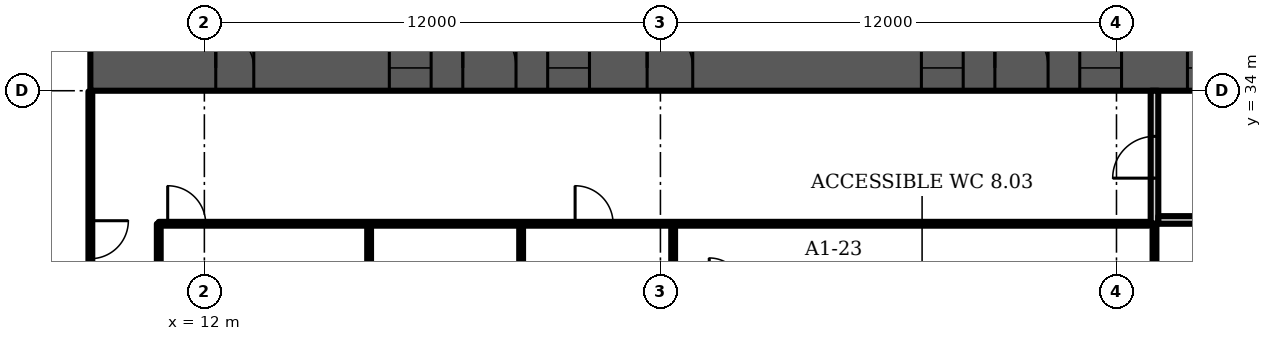
"""IFC4 building model, lengths in metres.
Left out: names, types, materials, properties, quantities, classifications, styles, units other than length and angle.
Written with IfcOpenShell. Run it as: python <this file> out.ifc"""

import sys

from ifc_helpers import new_model, si_unit, direction, frame, frame_2d, origin, place, context, subcontext, project, spatial, rectangle, extrude, element, fill, save


model = new_model("IFC4")
c1 = context("Model", 3, precision=1e-05, world=origin(), true_north=direction((0.0, 1.0)))
c2 = subcontext(c1, "Body", "Model", "MODEL_VIEW")
j1 = project(units=[si_unit("LENGTHUNIT", "METRE"), si_unit("PLANEANGLEUNIT", "RADIAN")], contexts=[c1])
p1 = place(None, origin())
s1 = spatial("IfcSite", under=j1, at=p1, CompositionType="ELEMENT")
p2 = place(p1, origin())
s2 = spatial("IfcBuilding", under=s1, at=p2, CompositionType="ELEMENT")
p3 = place(p2, frame((0.0, 0.0, 48.7)))
s3 = spatial("IfcBuildingStorey", under=s2, at=p3, CompositionType="ELEMENT", Elevation=48.7)
p4 = place(p3, frame((9.0, 34.6, 0.0), z_axis=(0.0, 0.0, 1.0), x_axis=(1.0, 0.0, 0.0)))
e1 = element("IfcWall", 1, at=p4, inside=s3, PredefinedType="SHEAR", context=c2, shape_type="SweptSolid", body=[
    extrude(rectangle(XDim=56.0, YDim=1.2, at=frame_2d((28.0, 0.0))), origin(), (0.0, 0.0, 1.0), 3.6),
])
p5 = place(p4, frame((3.3, 0.0, 0.0)))
e2 = element("IfcOpeningElement", 2, at=p5, cuts=e1, PredefinedType="OPENING", context=c2, shape_type="SweptSolid", body=[
    extrude(rectangle(XDim=1.0, YDim=2.1, at=frame_2d((0.5, 1.05))), frame((0.0, 0.61, 0.0), z_axis=(0.0, -1.0, 0.0), x_axis=(1.0, 0.0, 0.0)), (0.0, 0.0, 1.0), 1.22),
])
p6 = place(p4, frame((7.867, 0.0, 0.0)))
e3 = element("IfcOpeningElement", 3, at=p6, cuts=e1, PredefinedType="OPENING", context=c2, shape_type="SweptSolid", body=[
    extrude(rectangle(XDim=1.1, YDim=2.1, at=frame_2d((0.55, 1.05))), frame((0.0, 0.61, 0.0), z_axis=(0.0, -1.0, 0.0), x_axis=(1.0, 0.0, 0.0)), (0.0, 0.0, 1.0), 1.22),
])
p7 = place(p4, frame((12.033, 0.0, 0.0)))
e4 = element("IfcOpeningElement", 4, at=p7, cuts=e1, PredefinedType="OPENING", context=c2, shape_type="SweptSolid", body=[
    extrude(rectangle(XDim=1.1, YDim=2.1, at=frame_2d((0.55, 1.05))), frame((0.0, 0.61, 0.0), z_axis=(0.0, -1.0, 0.0), x_axis=(1.0, 0.0, 0.0)), (0.0, 0.0, 1.0), 1.22),
])
p8 = place(p4, frame((9.8, 0.0, 0.0)))
e5 = element("IfcOpeningElement", 5, at=p8, cuts=e1, PredefinedType="OPENING", context=c2, shape_type="SweptSolid", body=[
    extrude(rectangle(XDim=1.4, YDim=2.1, at=frame_2d((0.7, 1.05))), frame((0.0, 0.61, 0.0), z_axis=(0.0, -1.0, 0.0), x_axis=(1.0, 0.0, 0.0)), (0.0, 0.0, 1.0), 1.22),
])
p9 = place(p4, frame((14.65, 0.0, 0.0)))
e6 = element("IfcOpeningElement", 6, at=p9, cuts=e1, PredefinedType="OPENING", context=c2, shape_type="SweptSolid", body=[
    extrude(rectangle(XDim=1.2, YDim=2.1, at=frame_2d((0.6, 1.05))), frame((0.0, 0.61, 0.0), z_axis=(0.0, -1.0, 0.0), x_axis=(1.0, 0.0, 0.0)), (0.0, 0.0, 1.0), 1.22),
])
p10 = place(p4, frame((21.867, 0.0, 0.0)))
e7 = element("IfcOpeningElement", 7, at=p10, cuts=e1, PredefinedType="OPENING", context=c2, shape_type="SweptSolid", body=[
    extrude(rectangle(XDim=1.1, YDim=2.1, at=frame_2d((0.55, 1.05))), frame((0.0, 0.61, 0.0), z_axis=(0.0, -1.0, 0.0), x_axis=(1.0, 0.0, 0.0)), (0.0, 0.0, 1.0), 1.22),
])
p11 = place(p4, frame((26.033, 0.0, 0.0)))
e8 = element("IfcOpeningElement", 8, at=p11, cuts=e1, PredefinedType="OPENING", context=c2, shape_type="SweptSolid", body=[
    extrude(rectangle(XDim=1.1, YDim=2.1, at=frame_2d((0.55, 1.05))), frame((0.0, 0.61, 0.0), z_axis=(0.0, -1.0, 0.0), x_axis=(1.0, 0.0, 0.0)), (0.0, 0.0, 1.0), 1.22),
])
p12 = place(p4, frame((23.8, 0.0, 0.0)))
e9 = element("IfcOpeningElement", 9, at=p12, cuts=e1, PredefinedType="OPENING", context=c2, shape_type="SweptSolid", body=[
    extrude(rectangle(XDim=1.4, YDim=2.1, at=frame_2d((0.7, 1.05))), frame((0.0, 0.61, 0.0), z_axis=(0.0, -1.0, 0.0), x_axis=(1.0, 0.0, 0.0)), (0.0, 0.0, 1.0), 1.22),
])
p13 = place(p4, frame((28.867, 0.0, 0.0)))
e10 = element("IfcOpeningElement", 10, at=p13, cuts=e1, PredefinedType="OPENING", context=c2, shape_type="SweptSolid", body=[
    extrude(rectangle(XDim=1.1, YDim=2.1, at=frame_2d((0.55, 1.05))), frame((0.0, 0.61, 0.0), z_axis=(0.0, -1.0, 0.0), x_axis=(1.0, 0.0, 0.0)), (0.0, 0.0, 1.0), 1.22),
])
p14 = place(p4, frame((33.033, 0.0, 0.0)))
e11 = element("IfcOpeningElement", 11, at=p14, cuts=e1, PredefinedType="OPENING", context=c2, shape_type="SweptSolid", body=[
    extrude(rectangle(XDim=1.1, YDim=2.1, at=frame_2d((0.55, 1.05))), frame((0.0, 0.61, 0.0), z_axis=(0.0, -1.0, 0.0), x_axis=(1.0, 0.0, 0.0)), (0.0, 0.0, 1.0), 1.22),
])
p15 = place(p4, frame((40.15, 0.0, 0.0)))
e12 = element("IfcOpeningElement", 12, at=p15, cuts=e1, PredefinedType="OPENING", context=c2, shape_type="SweptSolid", body=[
    extrude(rectangle(XDim=1.2, YDim=2.1, at=frame_2d((0.6, 1.05))), frame((0.0, 0.61, 0.0), z_axis=(0.0, -1.0, 0.0), x_axis=(1.0, 0.0, 0.0)), (0.0, 0.0, 1.0), 1.22),
])
p16 = place(p4, frame((44.8, 0.0, 0.0)))
e13 = element("IfcOpeningElement", 13, at=p16, cuts=e1, PredefinedType="OPENING", context=c2, shape_type="SweptSolid", body=[
    extrude(rectangle(XDim=1.4, YDim=2.1, at=frame_2d((0.7, 1.05))), frame((0.0, 0.61, 0.0), z_axis=(0.0, -1.0, 0.0), x_axis=(1.0, 0.0, 0.0)), (0.0, 0.0, 1.0), 1.22),
])
p17 = place(p4, frame((49.867, 0.0, 0.0)))
e14 = element("IfcOpeningElement", 14, at=p17, cuts=e1, PredefinedType="OPENING", context=c2, shape_type="SweptSolid", body=[
    extrude(rectangle(XDim=1.1, YDim=2.1, at=frame_2d((0.55, 1.05))), frame((0.0, 0.61, 0.0), z_axis=(0.0, -1.0, 0.0), x_axis=(1.0, 0.0, 0.0)), (0.0, 0.0, 1.0), 1.22),
])
p18 = place(p4, frame((53.5, 0.0, 0.0)))
e15 = element("IfcOpeningElement", 15, at=p18, cuts=e1, PredefinedType="OPENING", context=c2, shape_type="SweptSolid", body=[
    extrude(rectangle(XDim=1.1, YDim=2.1, at=frame_2d((0.55, 1.05))), frame((0.0, 0.61, 0.0), z_axis=(0.0, -1.0, 0.0), x_axis=(1.0, 0.0, 0.0)), (0.0, 0.0, 1.0), 1.22),
])
p19 = place(p4, frame((51.567, 0.0, 0.0)))
e16 = element("IfcOpeningElement", 16, at=p19, cuts=e1, PredefinedType="OPENING", context=c2, shape_type="SweptSolid", body=[
    extrude(rectangle(XDim=1.4, YDim=2.1, at=frame_2d((0.7, 1.05))), frame((0.0, 0.61, 0.0), z_axis=(0.0, -1.0, 0.0), x_axis=(1.0, 0.0, 0.0)), (0.0, 0.0, 1.0), 1.22),
])
p20 = place(p3, frame((37.0, 30.5, 0.0), z_axis=(0.0, 0.0, 1.0), x_axis=(0.0, 1.0, 0.0)))
e17 = element("IfcWall", 17, at=p20, inside=s3, PredefinedType="PARTITIONING", context=c2, shape_type="SweptSolid", body=[
    extrude(rectangle(XDim=3.5, YDim=0.2, at=frame_2d((1.75, 0.0))), origin(), (0.0, 0.0, 1.0), 3.2),
])
p21 = place(p20, frame((1.2, 0.0, 0.0)))
e18 = element("IfcOpeningElement", 18, at=p21, cuts=e17, PredefinedType="OPENING", context=c2, shape_type="SweptSolid", body=[
    extrude(rectangle(XDim=1.1, YDim=2.1, at=frame_2d((0.55, 1.05))), frame((0.0, 0.11, 0.0), z_axis=(0.0, -1.0, 0.0), x_axis=(1.0, 0.0, 0.0)), (0.0, 0.0, 1.0), 0.22),
])
p22 = place(p3, frame((37.1, 30.6, 0.0), z_axis=(0.0, 0.0, 1.0), x_axis=(1.0, 0.0, 0.0)))
e19 = element("IfcWall", 19, at=p22, inside=s3, PredefinedType="PARTITIONING", context=c2, shape_type="SweptSolid", body=[
    extrude(rectangle(XDim=2.8, YDim=0.2, at=frame_2d((1.4, 0.0))), origin(), (0.0, 0.0, 1.0), 3.2),
])
p23 = place(p3, frame((9.0, 26.02, 0.0), z_axis=(0.0, 0.0, 1.0), x_axis=(0.0, 1.0, 0.0)))
e20 = element("IfcWall", 20, at=p23, inside=s3, PredefinedType="PARTITIONING", context=c2, shape_type="SweptSolid", body=[
    extrude(rectangle(XDim=7.96, YDim=0.1, at=frame_2d((3.98, 0.0))), origin(), (0.0, 0.0, 1.0), 3.2),
])
p24 = place(p23, frame((3.56, 0.0, 0.0)))
e21 = element("IfcOpeningElement", 21, at=p24, cuts=e20, PredefinedType="OPENING", context=c2, shape_type="SweptSolid", body=[
    extrude(rectangle(XDim=1.0, YDim=2.1, at=frame_2d((0.5, 1.05))), frame((0.0, 0.06, 0.0), z_axis=(0.0, -1.0, 0.0), x_axis=(1.0, 0.0, 0.0)), (0.0, 0.0, 1.0), 0.12),
])
p25 = place(p3, frame((10.8, 23.55, 0.0), z_axis=(0.0, 0.0, 1.0), x_axis=(0.0, 1.0, 0.0)))
e22 = element("IfcWall", 22, at=p25, inside=s3, PredefinedType="PARTITIONING", context=c2, shape_type="SweptSolid", body=[
    extrude(rectangle(XDim=6.95, YDim=0.1, at=frame_2d((3.475, 0.0))), origin(), (0.0, 0.0, 1.0), 3.2),
])
p26 = place(p25, frame((0.308, 0.0, 0.0)))
e23 = element("IfcOpeningElement", 23, at=p26, cuts=e22, PredefinedType="OPENING", context=c2, shape_type="SweptSolid", body=[
    extrude(rectangle(XDim=1.0, YDim=2.1, at=frame_2d((0.5, 1.05))), frame((0.0, 0.06, 0.0), z_axis=(0.0, -1.0, 0.0), x_axis=(1.0, 0.0, 0.0)), (0.0, 0.0, 1.0), 0.12),
])
p27 = place(p3, frame((10.8, 30.5, 0.0), z_axis=(0.0, 0.0, 1.0), x_axis=(1.0, 0.0, 0.0)))
e24 = element("IfcWall", 24, at=p27, inside=s3, PredefinedType="PARTITIONING", context=c2, shape_type="SweptSolid", body=[
    extrude(rectangle(XDim=26.05, YDim=0.1, at=frame_2d((13.025, 0.0))), origin(), (0.0, 0.0, 1.0), 3.2),
])
p28 = place(p27, frame((0.235, 0.0, 0.0)))
e25 = element("IfcOpeningElement", 25, at=p28, cuts=e24, PredefinedType="OPENING", context=c2, shape_type="SweptSolid", body=[
    extrude(rectangle(XDim=1.0, YDim=2.1, at=frame_2d((0.5, 1.05))), frame((0.0, 0.06, 0.0), z_axis=(0.0, -1.0, 0.0), x_axis=(1.0, 0.0, 0.0)), (0.0, 0.0, 1.0), 0.12),
])
p29 = place(p27, frame((10.955, 0.0, 0.0)))
e26 = element("IfcOpeningElement", 26, at=p29, cuts=e24, PredefinedType="OPENING", context=c2, shape_type="SweptSolid", body=[
    extrude(rectangle(XDim=1.0, YDim=2.1, at=frame_2d((0.5, 1.05))), frame((0.0, 0.06, 0.0), z_axis=(0.0, -1.0, 0.0), x_axis=(1.0, 0.0, 0.0)), (0.0, 0.0, 1.0), 0.12),
])
for number, where, z_axis, x_axis in (
    (27, (16.335, 14.24, 0.0), (0.0, 0.0, 1.0), (0.0, 1.0, 0.0)),
    (28, (20.335, 14.24, 0.0), (0.0, 0.0, 1.0), (0.0, 1.0, 0.0)),
):
    element("IfcWall", number, at=place(p3, frame(where, z_axis=z_axis, x_axis=x_axis)), inside=s3, PredefinedType="PARTITIONING", context=c2, shape_type="SweptSolid", body=[
        extrude(rectangle(XDim=16.26, YDim=0.1, at=frame_2d((8.13, 0.0))), origin(), (0.0, 0.0, 1.0), 3.2),
    ])
p30 = place(p3, frame((24.335, 14.24, 0.0), z_axis=(0.0, 0.0, 1.0), x_axis=(0.0, 1.0, 0.0)))
e29 = element("IfcWall", 29, at=p30, inside=s3, PredefinedType="PARTITIONING", context=c2, shape_type="SweptSolid", body=[
    extrude(rectangle(XDim=16.25, YDim=0.1, at=frame_2d((8.125, 0.0))), origin(), (0.0, 0.0, 1.0), 3.2),
])
p31 = place(p3, frame((37.0, 14.24, 0.0), z_axis=(0.0, 0.0, 1.0), x_axis=(0.0, 1.0, 0.0)))
e30 = element("IfcWall", 30, at=p31, inside=s3, PredefinedType="PARTITIONING", context=c2, shape_type="SweptSolid", body=[
    extrude(rectangle(XDim=16.26, YDim=0.1, at=frame_2d((8.13, 0.0))), origin(), (0.0, 0.0, 1.0), 3.2),
])
p32 = place(p5, origin())
e31 = element("IfcDoor", 31, at=p32, inside=s3, OperationType="SINGLE_SWING_LEFT", PredefinedType="DOOR", context=c2, shape_type="SweptSolid", body=[
    extrude(rectangle(XDim=1.0, YDim=2.1, at=frame_2d((0.5, 1.05))), frame((0.0, 0.6, 0.0), z_axis=(0.0, -1.0, 0.0), x_axis=(1.0, 0.0, 0.0)), (0.0, 0.0, 1.0), 1.199),
])
fill(e2, e31)
p33 = place(p6, origin())
e32 = element("IfcDoor", 32, at=p33, inside=s3, OperationType="DOUBLE_DOOR_SLIDING", PredefinedType="DOOR", context=c2, shape_type="SweptSolid", body=[
    extrude(rectangle(XDim=1.1, YDim=2.1, at=frame_2d((0.55, 1.05))), frame((0.0, 0.025, 0.0), z_axis=(0.0, -1.0, 0.0), x_axis=(1.0, 0.0, 0.0)), (0.0, 0.0, 1.0), 0.05),
])
fill(e3, e32)
p34 = place(p7, origin())
e33 = element("IfcDoor", 33, at=p34, inside=s3, OperationType="DOUBLE_DOOR_SLIDING", PredefinedType="DOOR", context=c2, shape_type="SweptSolid", body=[
    extrude(rectangle(XDim=1.1, YDim=2.1, at=frame_2d((0.55, 1.05))), frame((0.0, 0.025, 0.0), z_axis=(0.0, -1.0, 0.0), x_axis=(1.0, 0.0, 0.0)), (0.0, 0.0, 1.0), 0.05),
])
fill(e4, e33)
p35 = place(p8, origin())
e34 = element("IfcDoor", 34, at=p35, inside=s3, OperationType="DOUBLE_DOOR_SINGLE_SWING", PredefinedType="DOOR", context=c2, shape_type="SweptSolid", body=[
    extrude(rectangle(XDim=1.4, YDim=2.1, at=frame_2d((0.7, 1.05))), frame((0.0, 0.025, 0.0), z_axis=(0.0, -1.0, 0.0), x_axis=(1.0, 0.0, 0.0)), (0.0, 0.0, 1.0), 0.05),
])
fill(e5, e34)
p36 = place(p9, origin())
e35 = element("IfcDoor", 35, at=p36, inside=s3, OperationType="SINGLE_SWING_LEFT", PredefinedType="DOOR", context=c2, shape_type="SweptSolid", body=[
    extrude(rectangle(XDim=1.2, YDim=2.1, at=frame_2d((0.6, 1.05))), frame((0.0, 0.025, 0.0), z_axis=(0.0, -1.0, 0.0), x_axis=(1.0, 0.0, 0.0)), (0.0, 0.0, 1.0), 0.05),
])
fill(e6, e35)
p37 = place(p10, origin())
e36 = element("IfcDoor", 36, at=p37, inside=s3, OperationType="DOUBLE_DOOR_SLIDING", PredefinedType="DOOR", context=c2, shape_type="SweptSolid", body=[
    extrude(rectangle(XDim=1.1, YDim=2.1, at=frame_2d((0.55, 1.05))), frame((0.0, 0.025, 0.0), z_axis=(0.0, -1.0, 0.0), x_axis=(1.0, 0.0, 0.0)), (0.0, 0.0, 1.0), 0.05),
])
fill(e7, e36)
p38 = place(p11, origin())
e37 = element("IfcDoor", 37, at=p38, inside=s3, OperationType="DOUBLE_DOOR_SLIDING", PredefinedType="DOOR", context=c2, shape_type="SweptSolid", body=[
    extrude(rectangle(XDim=1.1, YDim=2.1, at=frame_2d((0.55, 1.05))), frame((0.0, 0.025, 0.0), z_axis=(0.0, -1.0, 0.0), x_axis=(1.0, 0.0, 0.0)), (0.0, 0.0, 1.0), 0.05),
])
fill(e8, e37)
p39 = place(p12, origin())
e38 = element("IfcDoor", 38, at=p39, inside=s3, OperationType="DOUBLE_DOOR_SINGLE_SWING", PredefinedType="DOOR", context=c2, shape_type="SweptSolid", body=[
    extrude(rectangle(XDim=1.4, YDim=2.1, at=frame_2d((0.7, 1.05))), frame((0.0, 0.025, 0.0), z_axis=(0.0, -1.0, 0.0), x_axis=(1.0, 0.0, 0.0)), (0.0, 0.0, 1.0), 0.05),
])
fill(e9, e38)
p40 = place(p13, origin())
e39 = element("IfcDoor", 39, at=p40, inside=s3, OperationType="DOUBLE_DOOR_SLIDING", PredefinedType="DOOR", context=c2, shape_type="SweptSolid", body=[
    extrude(rectangle(XDim=1.1, YDim=2.1, at=frame_2d((0.55, 1.05))), frame((0.0, 0.025, 0.0), z_axis=(0.0, -1.0, 0.0), x_axis=(1.0, 0.0, 0.0)), (0.0, 0.0, 1.0), 0.05),
])
fill(e10, e39)
p41 = place(p21, origin())
e40 = element("IfcDoor", 40, at=p41, inside=s3, OperationType="SINGLE_SWING_LEFT", PredefinedType="DOOR", context=c2, shape_type="SweptSolid", body=[
    extrude(rectangle(XDim=1.1, YDim=2.1, at=frame_2d((0.55, 1.05))), frame((0.0, 0.025, 0.0), z_axis=(0.0, -1.0, 0.0), x_axis=(1.0, 0.0, 0.0)), (0.0, 0.0, 1.0), 0.05),
])
fill(e18, e40)
p42 = place(p24, origin())
e41 = element("IfcDoor", 41, at=p42, inside=s3, OperationType="SINGLE_SWING_RIGHT", PredefinedType="DOOR", context=c2, shape_type="SweptSolid", body=[
    extrude(rectangle(XDim=1.0, YDim=2.1, at=frame_2d((0.5, 1.05))), frame((0.0, 0.025, 0.0), z_axis=(0.0, -1.0, 0.0), x_axis=(1.0, 0.0, 0.0)), (0.0, 0.0, 1.0), 0.05),
])
fill(e21, e41)
p43 = place(p28, origin())
e42 = element("IfcDoor", 42, at=p43, inside=s3, OperationType="SINGLE_SWING_LEFT", PredefinedType="DOOR", context=c2, shape_type="SweptSolid", body=[
    extrude(rectangle(XDim=1.0, YDim=2.1, at=frame_2d((0.5, 1.05))), frame((0.0, 0.025, 0.0), z_axis=(0.0, -1.0, 0.0), x_axis=(1.0, 0.0, 0.0)), (0.0, 0.0, 1.0), 0.05),
])
fill(e25, e42)
p44 = place(p29, origin())
e43 = element("IfcDoor", 43, at=p44, inside=s3, OperationType="SINGLE_SWING_LEFT", PredefinedType="DOOR", context=c2, shape_type="SweptSolid", body=[
    extrude(rectangle(XDim=1.0, YDim=2.1, at=frame_2d((0.5, 1.05))), frame((0.0, 0.025, 0.0), z_axis=(0.0, -1.0, 0.0), x_axis=(1.0, 0.0, 0.0)), (0.0, 0.0, 1.0), 0.05),
])
fill(e26, e43)
save(model, sys.argv[1])
